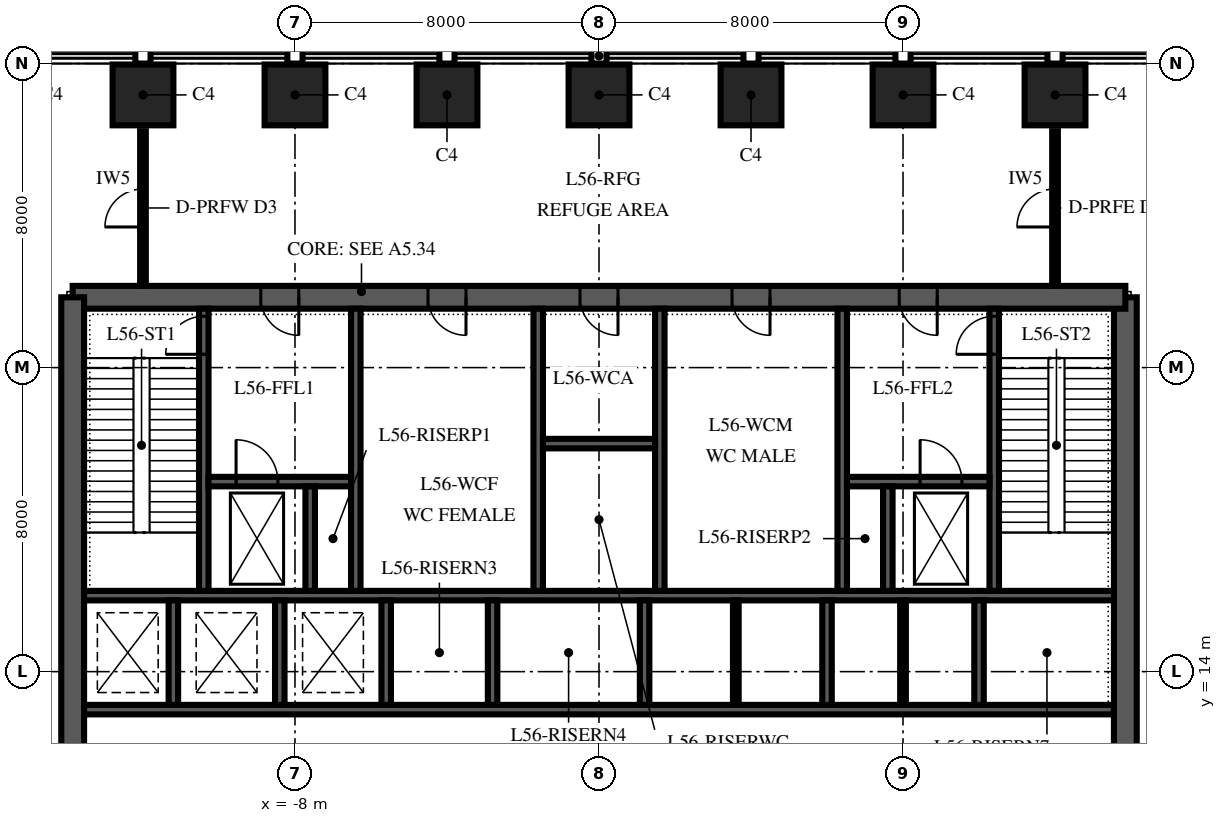
"""IFC4 building model, lengths in metres.
Left out: names, types, materials, properties, quantities, classifications, styles, units other than length and angle.
Written with IfcOpenShell. Run it as: python <this file> out.ifc"""

import sys

from ifc_helpers import new_model, si_unit, direction, frame, frame_2d, origin, origin_2d, place, context, subcontext, project, spatial, polyline, rectangle, outline, extrude, element, fill, save


model = new_model("IFC4")
c1 = context("Model", 3, precision=1e-05, world=origin(), true_north=direction((0.0, 1.0)))
c2 = subcontext(c1, "Body", "Model", "MODEL_VIEW")
j1 = project(units=[si_unit("LENGTHUNIT", "METRE"), si_unit("PLANEANGLEUNIT", "RADIAN")], contexts=[c1])
p1 = place(None, origin())
s1 = spatial("IfcSite", under=j1, at=p1, CompositionType="ELEMENT")
p2 = place(p1, origin())
s2 = spatial("IfcBuilding", under=s1, at=p2, CompositionType="ELEMENT")
p3 = place(p2, frame((0.0, 0.0, 242.0)))
s3 = spatial("IfcBuildingStorey", under=s2, at=p3, CompositionType="ELEMENT", Elevation=242.0)
for number, where, z_axis, x_axis in (
    (1, (12.0, 29.175, 0.0), (0.0, 0.0, 1.0), (-1.0, 0.0, 0.0)),
    (2, (8.0, 29.175, 0.0), (0.0, 0.0, 1.0), (-1.0, 0.0, 0.0)),
    (3, (4.0, 29.175, 0.0), (0.0, 0.0, 1.0), (-1.0, 0.0, 0.0)),
    (4, (0.0, 29.175, 0.0), (0.0, 0.0, 1.0), (-1.0, 0.0, 0.0)),
    (5, (-4.0, 29.175, 0.0), (0.0, 0.0, 1.0), (-1.0, 0.0, 0.0)),
    (6, (-8.0, 29.175, 0.0), (0.0, 0.0, 1.0), (-1.0, 0.0, 0.0)),
    (7, (-12.0, 29.175, 0.0), (0.0, 0.0, 1.0), (-1.0, 0.0, 0.0)),
):
    element("IfcColumn", number, at=place(p3, frame(where, z_axis=z_axis, x_axis=x_axis)), inside=s3, PredefinedType="COLUMN", context=c2, shape_type="SweptSolid", body=[
        extrude(rectangle(XDim=1.6, YDim=1.6, at=origin_2d()), origin(), (0.0, 0.0, 1.0), 6.0),
    ])
p4 = place(p3, frame((13.85, 6.15, 0.0), z_axis=(0.0, 0.0, 1.0), x_axis=(0.0, 1.0, 0.0)))
e8 = element("IfcWall", 8, at=p4, inside=s3, PredefinedType="SHEAR", context=c2, shape_type="SweptSolid", body=[
    extrude(outline(polyline([(0.0, -0.3), (17.7, -0.3), (17.7, 0.0), (17.4, 0.0), (17.4, 0.3), (0.3, 0.3), (0.3, 0.0), (0.0, 0.0), (0.0, -0.3)])), origin(), (0.0, 0.0, 1.0), 6.0),
])
p5 = place(p3, frame((13.85, 23.85, 0.0), z_axis=(0.0, 0.0, 1.0), x_axis=(-1.0, 0.0, 0.0)))
e9 = element("IfcWall", 9, at=p5, inside=s3, PredefinedType="SHEAR", context=c2, shape_type="SweptSolid", body=[
    extrude(rectangle(XDim=27.7, YDim=0.6, at=frame_2d((13.85, 0.0))), origin(), (0.0, 0.0, 1.0), 6.0),
])
p6 = place(p5, frame((21.75, 0.0, 0.0)))
e10 = element("IfcOpeningElement", 10, at=p6, cuts=e9, PredefinedType="OPENING", context=c2, shape_type="SweptSolid", body=[
    extrude(rectangle(XDim=1.0, YDim=2.1, at=frame_2d((0.5, 1.05))), frame((0.0, 0.315, 0.0), z_axis=(0.0, -1.0, 0.0), x_axis=(1.0, 0.0, 0.0)), (0.0, 0.0, 1.0), 0.63),
])
p7 = place(p5, frame((4.95, 0.0, 0.0)))
e11 = element("IfcOpeningElement", 11, at=p7, cuts=e9, PredefinedType="OPENING", context=c2, shape_type="SweptSolid", body=[
    extrude(rectangle(XDim=1.0, YDim=2.1, at=frame_2d((0.5, 1.05))), frame((0.0, 0.315, 0.0), z_axis=(0.0, -1.0, 0.0), x_axis=(1.0, 0.0, 0.0)), (0.0, 0.0, 1.0), 0.63),
])
p8 = place(p5, frame((17.35, 0.0, 0.0)))
e12 = element("IfcOpeningElement", 12, at=p8, cuts=e9, PredefinedType="OPENING", context=c2, shape_type="SweptSolid", body=[
    extrude(rectangle(XDim=1.0, YDim=2.1, at=frame_2d((0.5, 1.05))), frame((0.0, 0.315, 0.0), z_axis=(0.0, -1.0, 0.0), x_axis=(1.0, 0.0, 0.0)), (0.0, 0.0, 1.0), 0.63),
])
p9 = place(p5, frame((13.35, 0.0, 0.0)))
e13 = element("IfcOpeningElement", 13, at=p9, cuts=e9, PredefinedType="OPENING", context=c2, shape_type="SweptSolid", body=[
    extrude(rectangle(XDim=1.0, YDim=2.1, at=frame_2d((0.5, 1.05))), frame((0.0, 0.315, 0.0), z_axis=(0.0, -1.0, 0.0), x_axis=(1.0, 0.0, 0.0)), (0.0, 0.0, 1.0), 0.63),
])
p10 = place(p5, frame((9.35, 0.0, 0.0)))
e14 = element("IfcOpeningElement", 14, at=p10, cuts=e9, PredefinedType="OPENING", context=c2, shape_type="SweptSolid", body=[
    extrude(rectangle(XDim=1.0, YDim=2.1, at=frame_2d((0.5, 1.05))), frame((0.0, 0.315, 0.0), z_axis=(0.0, -1.0, 0.0), x_axis=(1.0, 0.0, 0.0)), (0.0, 0.0, 1.0), 0.63),
])
p11 = place(p3, frame((-13.85, 23.85, 0.0), z_axis=(0.0, 0.0, 1.0), x_axis=(0.0, -1.0, 0.0)))
e15 = element("IfcWall", 15, at=p11, inside=s3, PredefinedType="SHEAR", context=c2, shape_type="SweptSolid", body=[
    extrude(outline(polyline([(0.0, -0.3), (17.7, -0.3), (17.7, 0.0), (17.4, 0.0), (17.4, 0.3), (0.3, 0.3), (0.3, 0.0), (0.0, 0.0), (0.0, -0.3)])), origin(), (0.0, 0.0, 1.0), 6.0),
])
for number, where, z_axis, x_axis in (
    (16, (-13.55, 13.0, 0.0), (0.0, 0.0, 1.0), (1.0, 0.0, 0.0)),
    (17, (-13.55, 16.0, 0.0), (0.0, 0.0, 1.0), (1.0, 0.0, 0.0)),
):
    element("IfcWall", number, at=place(p3, frame(where, z_axis=z_axis, x_axis=x_axis)), inside=s3, PredefinedType="SHEAR", context=c2, shape_type="SweptSolid", body=[
        extrude(rectangle(XDim=27.1, YDim=0.25, at=frame_2d((13.55, 0.0))), origin(), (0.0, 0.0, 1.0), 6.0),
    ])
for number, where, z_axis, x_axis in (
    (18, (-11.2, 13.125, 0.0), (0.0, 0.0, 1.0), (0.0, 1.0, 0.0)),
    (19, (-8.4, 13.125, 0.0), (0.0, 0.0, 1.0), (0.0, 1.0, 0.0)),
    (20, (-5.6, 13.125, 0.0), (0.0, 0.0, 1.0), (0.0, 1.0, 0.0)),
    (21, (-2.8, 13.125, 0.0), (0.0, 0.0, 1.0), (0.0, 1.0, 0.0)),
    (22, (1.2, 13.125, 0.0), (0.0, 0.0, 1.0), (0.0, 1.0, 0.0)),
    (23, (6.0, 13.125, 0.0), (0.0, 0.0, 1.0), (0.0, 1.0, 0.0)),
    (24, (10.0, 13.125, 0.0), (0.0, 0.0, 1.0), (0.0, 1.0, 0.0)),
):
    element("IfcWall", number, at=place(p3, frame(where, z_axis=z_axis, x_axis=x_axis)), inside=s3, PredefinedType="SHEAR", context=c2, shape_type="SweptSolid", body=[
        extrude(rectangle(XDim=2.75, YDim=0.25, at=frame_2d((1.375, 0.0))), origin(), (0.0, 0.0, 1.0), 6.0),
    ])
p12 = place(p3, frame((-10.4, 16.125, 0.0), z_axis=(0.0, 0.0, 1.0), x_axis=(0.0, 1.0, 0.0)))
e25 = element("IfcWall", 25, at=p12, inside=s3, PredefinedType="SHEAR", context=c2, shape_type="SweptSolid", body=[
    extrude(rectangle(XDim=7.425, YDim=0.25, at=frame_2d((3.712, 0.0))), origin(), (0.0, 0.0, 1.0), 6.0),
])
p13 = place(p12, frame((6.225, 0.0, 0.0)))
e26 = element("IfcOpeningElement", 26, at=p13, cuts=e25, PredefinedType="OPENING", context=c2, shape_type="SweptSolid", body=[
    extrude(rectangle(XDim=1.0, YDim=2.1, at=frame_2d((0.5, 1.05))), frame((0.0, 0.14, 0.0), z_axis=(0.0, -1.0, 0.0), x_axis=(1.0, 0.0, 0.0)), (0.0, 0.0, 1.0), 0.28),
])
for number, where, z_axis, x_axis in (
    (27, (-6.4, 16.125, 0.0), (0.0, 0.0, 1.0), (0.0, 1.0, 0.0)),
    (28, (-1.6, 16.125, 0.0), (0.0, 0.0, 1.0), (0.0, 1.0, 0.0)),
    (29, (1.6, 16.125, 0.0), (0.0, 0.0, 1.0), (0.0, 1.0, 0.0)),
    (30, (6.4, 16.125, 0.0), (0.0, 0.0, 1.0), (0.0, 1.0, 0.0)),
):
    element("IfcWall", number, at=place(p3, frame(where, z_axis=z_axis, x_axis=x_axis)), inside=s3, PredefinedType="SHEAR", context=c2, shape_type="SweptSolid", body=[
        extrude(rectangle(XDim=7.425, YDim=0.25, at=frame_2d((3.712, 0.0))), origin(), (0.0, 0.0, 1.0), 6.0),
    ])
p14 = place(p3, frame((10.4, 16.125, 0.0), z_axis=(0.0, 0.0, 1.0), x_axis=(0.0, 1.0, 0.0)))
e31 = element("IfcWall", 31, at=p14, inside=s3, PredefinedType="SHEAR", context=c2, shape_type="SweptSolid", body=[
    extrude(rectangle(XDim=7.425, YDim=0.25, at=frame_2d((3.712, 0.0))), origin(), (0.0, 0.0, 1.0), 6.0),
])
p15 = place(p14, frame((6.225, 0.0, 0.0)))
e32 = element("IfcOpeningElement", 32, at=p15, cuts=e31, PredefinedType="OPENING", context=c2, shape_type="SweptSolid", body=[
    extrude(rectangle(XDim=1.0, YDim=2.1, at=frame_2d((0.5, 1.05))), frame((0.0, 0.14, 0.0), z_axis=(0.0, -1.0, 0.0), x_axis=(1.0, 0.0, 0.0)), (0.0, 0.0, 1.0), 0.28),
])
p16 = place(p3, frame((-10.275, 19.0, 0.0), z_axis=(0.0, 0.0, 1.0), x_axis=(1.0, 0.0, 0.0)))
e33 = element("IfcWall", 33, at=p16, inside=s3, PredefinedType="SHEAR", context=c2, shape_type="SweptSolid", body=[
    extrude(rectangle(XDim=3.75, YDim=0.25, at=frame_2d((1.875, 0.0))), origin(), (0.0, 0.0, 1.0), 6.0),
])
p17 = place(p16, frame((0.725, 0.0, 0.0)))
e34 = element("IfcOpeningElement", 34, at=p17, cuts=e33, PredefinedType="OPENING", context=c2, shape_type="SweptSolid", body=[
    extrude(rectangle(XDim=1.1, YDim=2.1, at=frame_2d((0.55, 1.05))), frame((0.0, 0.14, 0.0), z_axis=(0.0, -1.0, 0.0), x_axis=(1.0, 0.0, 0.0)), (0.0, 0.0, 1.0), 0.28),
])
p18 = place(p3, frame((6.525, 19.0, 0.0), z_axis=(0.0, 0.0, 1.0), x_axis=(1.0, 0.0, 0.0)))
e35 = element("IfcWall", 35, at=p18, inside=s3, PredefinedType="SHEAR", context=c2, shape_type="SweptSolid", body=[
    extrude(rectangle(XDim=3.75, YDim=0.25, at=frame_2d((1.875, 0.0))), origin(), (0.0, 0.0, 1.0), 6.0),
])
p19 = place(p18, frame((1.925, 0.0, 0.0)))
e36 = element("IfcOpeningElement", 36, at=p19, cuts=e35, PredefinedType="OPENING", context=c2, shape_type="SweptSolid", body=[
    extrude(rectangle(XDim=1.1, YDim=2.1, at=frame_2d((0.55, 1.05))), frame((0.0, 0.14, 0.0), z_axis=(0.0, -1.0, 0.0), x_axis=(1.0, 0.0, 0.0)), (0.0, 0.0, 1.0), 0.28),
])
for number, where, z_axis, x_axis in (
    (37, (-7.6, 16.125, 0.0), (0.0, 0.0, 1.0), (0.0, 1.0, 0.0)),
    (38, (7.6, 16.125, 0.0), (0.0, 0.0, 1.0), (0.0, 1.0, 0.0)),
):
    element("IfcWall", number, at=place(p3, frame(where, z_axis=z_axis, x_axis=x_axis)), inside=s3, PredefinedType="SHEAR", context=c2, shape_type="SweptSolid", body=[
        extrude(rectangle(XDim=2.75, YDim=0.25, at=frame_2d((1.375, 0.0))), origin(), (0.0, 0.0, 1.0), 6.0),
    ])
p20 = place(p3, frame((-1.475, 20.0, 0.0), z_axis=(0.0, 0.0, 1.0), x_axis=(1.0, 0.0, 0.0)))
e39 = element("IfcWall", 39, at=p20, inside=s3, PredefinedType="SHEAR", context=c2, shape_type="SweptSolid", body=[
    extrude(rectangle(XDim=2.95, YDim=0.25, at=frame_2d((1.475, 0.0))), origin(), (0.0, 0.0, 1.0), 6.0),
])
for number, where, z_axis, x_axis in (
    (40, (3.6, 13.125, 0.0), (0.0, 0.0, 1.0), (0.0, 1.0, 0.0)),
    (41, (8.0, 13.125, 0.0), (0.0, 0.0, 1.0), (0.0, 1.0, 0.0)),
):
    element("IfcWall", number, at=place(p3, frame(where, z_axis=z_axis, x_axis=x_axis)), inside=s3, PredefinedType="PARTITIONING", context=c2, shape_type="SweptSolid", body=[
        extrude(rectangle(XDim=2.75, YDim=0.15, at=frame_2d((1.375, 0.0))), origin(), (0.0, 0.0, 1.0), 5.85),
    ])
p21 = place(p3, frame((12.0, 24.15, 0.0), z_axis=(0.0, 0.0, 1.0), x_axis=(0.0, 1.0, 0.0)))
e42 = element("IfcWall", 42, at=p21, inside=s3, PredefinedType="PARTITIONING", context=c2, shape_type="SweptSolid", body=[
    extrude(rectangle(XDim=4.07, YDim=0.15, at=frame_2d((2.035, 0.0))), origin(), (0.0, 0.0, 1.0), 5.85),
])
p22 = place(p21, frame((1.55, 0.0, 0.0)))
e43 = element("IfcOpeningElement", 43, at=p22, cuts=e42, PredefinedType="OPENING", context=c2, shape_type="SweptSolid", body=[
    extrude(rectangle(XDim=1.0, YDim=2.1, at=frame_2d((0.5, 1.05))), frame((0.0, 0.09, 0.0), z_axis=(0.0, -1.0, 0.0), x_axis=(1.0, 0.0, 0.0)), (0.0, 0.0, 1.0), 0.18),
])
p23 = place(p3, frame((-12.0, 24.15, 0.0), z_axis=(0.0, 0.0, 1.0), x_axis=(0.0, 1.0, 0.0)))
e44 = element("IfcWall", 44, at=p23, inside=s3, PredefinedType="PARTITIONING", context=c2, shape_type="SweptSolid", body=[
    extrude(rectangle(XDim=4.07, YDim=0.15, at=frame_2d((2.035, 0.0))), origin(), (0.0, 0.0, 1.0), 5.85),
])
p24 = place(p23, frame((1.55, 0.0, 0.0)))
e45 = element("IfcOpeningElement", 45, at=p24, cuts=e44, PredefinedType="OPENING", context=c2, shape_type="SweptSolid", body=[
    extrude(rectangle(XDim=1.0, YDim=2.1, at=frame_2d((0.5, 1.05))), frame((0.0, 0.09, 0.0), z_axis=(0.0, -1.0, 0.0), x_axis=(1.0, 0.0, 0.0)), (0.0, 0.0, 1.0), 0.18),
])
p25 = place(p6, origin())
e46 = element("IfcDoor", 46, at=p25, inside=s3, OperationType="SINGLE_SWING_RIGHT", PredefinedType="DOOR", context=c2, shape_type="SweptSolid", body=[
    extrude(rectangle(XDim=1.0, YDim=2.1, at=frame_2d((0.5, 1.05))), frame((0.0, 0.3, 0.0), z_axis=(0.0, -1.0, 0.0), x_axis=(1.0, 0.0, 0.0)), (0.0, 0.0, 1.0), 0.6),
])
fill(e10, e46)
p26 = place(p7, origin())
e47 = element("IfcDoor", 47, at=p26, inside=s3, OperationType="SINGLE_SWING_RIGHT", PredefinedType="DOOR", context=c2, shape_type="SweptSolid", body=[
    extrude(rectangle(XDim=1.0, YDim=2.1, at=frame_2d((0.5, 1.05))), frame((0.0, 0.3, 0.0), z_axis=(0.0, -1.0, 0.0), x_axis=(1.0, 0.0, 0.0)), (0.0, 0.0, 1.0), 0.6),
])
fill(e11, e47)
p27 = place(p8, origin())
e48 = element("IfcDoor", 48, at=p27, inside=s3, OperationType="SINGLE_SWING_LEFT", PredefinedType="DOOR", context=c2, shape_type="SweptSolid", body=[
    extrude(rectangle(XDim=1.0, YDim=2.1, at=frame_2d((0.5, 1.05))), frame((0.0, 0.3, 0.0), z_axis=(0.0, -1.0, 0.0), x_axis=(1.0, 0.0, 0.0)), (0.0, 0.0, 1.0), 0.6),
])
fill(e12, e48)
p28 = place(p9, origin())
e49 = element("IfcDoor", 49, at=p28, inside=s3, OperationType="SINGLE_SWING_LEFT", PredefinedType="DOOR", context=c2, shape_type="SweptSolid", body=[
    extrude(rectangle(XDim=1.0, YDim=2.1, at=frame_2d((0.5, 1.05))), frame((0.0, 0.3, 0.0), z_axis=(0.0, -1.0, 0.0), x_axis=(1.0, 0.0, 0.0)), (0.0, 0.0, 1.0), 0.6),
])
fill(e13, e49)
p29 = place(p10, origin())
e50 = element("IfcDoor", 50, at=p29, inside=s3, OperationType="SINGLE_SWING_LEFT", PredefinedType="DOOR", context=c2, shape_type="SweptSolid", body=[
    extrude(rectangle(XDim=1.0, YDim=2.1, at=frame_2d((0.5, 1.05))), frame((0.0, 0.3, 0.0), z_axis=(0.0, -1.0, 0.0), x_axis=(1.0, 0.0, 0.0)), (0.0, 0.0, 1.0), 0.6),
])
fill(e14, e50)
p30 = place(p13, origin())
e51 = element("IfcDoor", 51, at=p30, inside=s3, OperationType="SINGLE_SWING_LEFT", PredefinedType="DOOR", context=c2, shape_type="SweptSolid", body=[
    extrude(rectangle(XDim=1.0, YDim=2.1, at=frame_2d((0.5, 1.05))), frame((0.0, 0.125, 0.0), z_axis=(0.0, -1.0, 0.0), x_axis=(1.0, 0.0, 0.0)), (0.0, 0.0, 1.0), 0.25),
])
fill(e26, e51)
p31 = place(p15, origin())
e52 = element("IfcDoor", 52, at=p31, inside=s3, OperationType="SINGLE_SWING_LEFT", PredefinedType="DOOR", context=c2, shape_type="SweptSolid", body=[
    extrude(rectangle(XDim=1.0, YDim=2.1, at=frame_2d((0.5, 1.05))), frame((0.0, 0.125, 0.0), z_axis=(0.0, -1.0, 0.0), x_axis=(1.0, 0.0, 0.0)), (0.0, 0.0, 1.0), 0.25),
])
fill(e32, e52)
p32 = place(p19, origin())
e53 = element("IfcDoor", 53, at=p32, inside=s3, OperationType="SLIDING_TO_RIGHT", PredefinedType="DOOR", context=c2, shape_type="SweptSolid", body=[
    extrude(rectangle(XDim=1.1, YDim=2.1, at=frame_2d((0.55, 1.05))), frame((0.0, 0.125, 0.0), z_axis=(0.0, -1.0, 0.0), x_axis=(1.0, 0.0, 0.0)), (0.0, 0.0, 1.0), 0.25),
])
fill(e36, e53)
p33 = place(p17, origin())
e54 = element("IfcDoor", 54, at=p33, inside=s3, OperationType="SLIDING_TO_RIGHT", PredefinedType="DOOR", context=c2, shape_type="SweptSolid", body=[
    extrude(rectangle(XDim=1.1, YDim=2.1, at=frame_2d((0.55, 1.05))), frame((0.0, 0.125, 0.0), z_axis=(0.0, -1.0, 0.0), x_axis=(1.0, 0.0, 0.0)), (0.0, 0.0, 1.0), 0.25),
])
fill(e34, e54)
p34 = place(p22, origin())
e55 = element("IfcDoor", 55, at=p34, inside=s3, OperationType="SINGLE_SWING_RIGHT", PredefinedType="DOOR", context=c2, shape_type="SweptSolid", body=[
    extrude(rectangle(XDim=1.0, YDim=2.1, at=frame_2d((0.5, 1.05))), frame((0.0, 0.075, 0.0), z_axis=(0.0, -1.0, 0.0), x_axis=(1.0, 0.0, 0.0)), (0.0, 0.0, 1.0), 0.149),
])
fill(e43, e55)
p35 = place(p24, origin())
e56 = element("IfcDoor", 56, at=p35, inside=s3, OperationType="SINGLE_SWING_RIGHT", PredefinedType="DOOR", context=c2, shape_type="SweptSolid", body=[
    extrude(rectangle(XDim=1.0, YDim=2.1, at=frame_2d((0.5, 1.05))), frame((0.0, 0.075, 0.0), z_axis=(0.0, -1.0, 0.0), x_axis=(1.0, 0.0, 0.0)), (0.0, 0.0, 1.0), 0.149),
])
fill(e45, e56)
save(model, sys.argv[1])
